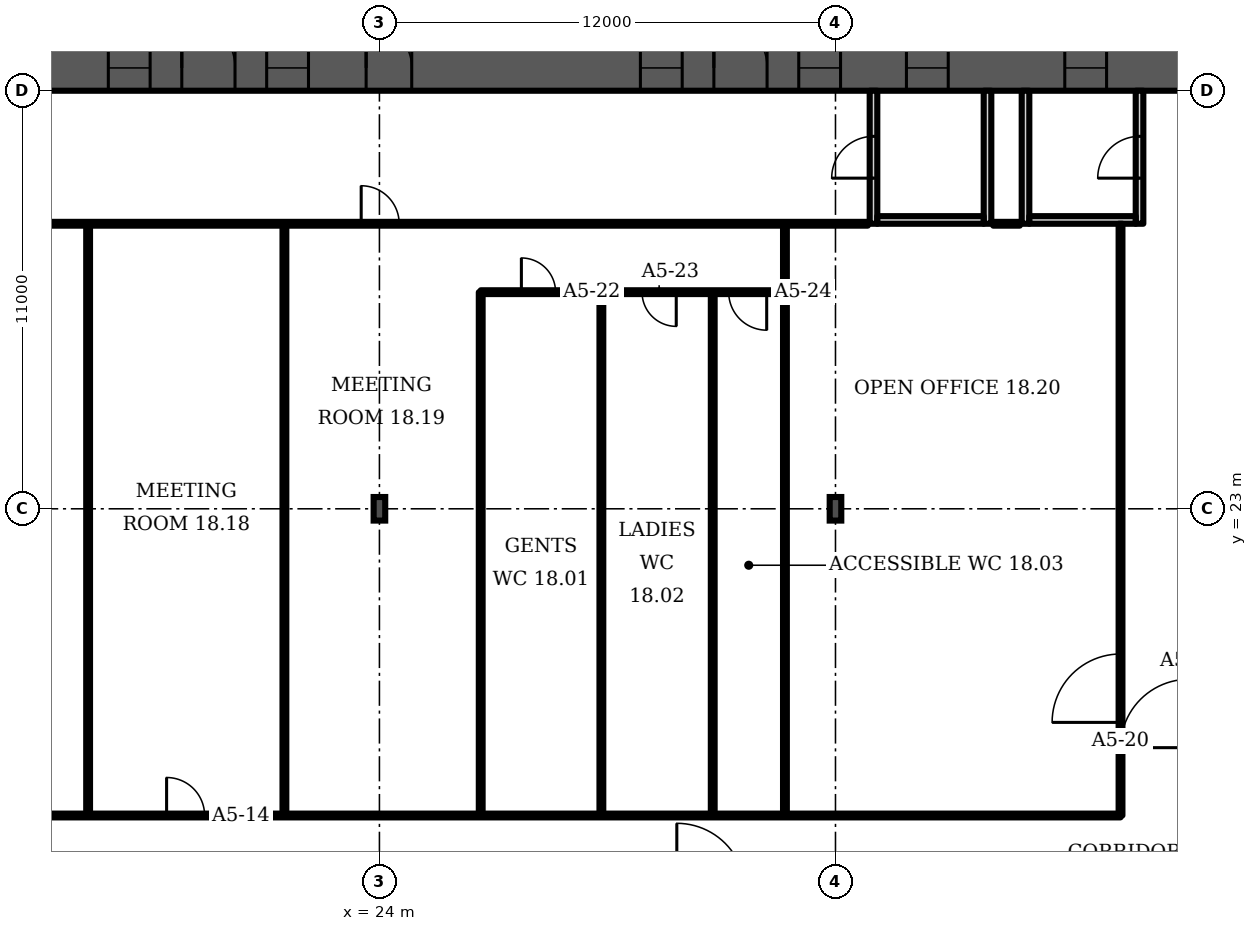
"""IFC4 building model, lengths in metres.
Left out: names, types, materials, properties, quantities, classifications, styles, units other than length and angle.
Written with IfcOpenShell. Run it as: python <this file> out.ifc"""

import sys

from ifc_helpers import new_model, si_unit, direction, frame, frame_2d, origin, origin_2d, place, context, subcontext, project, spatial, rectangle, i_section, extrude, element, fill, save


model = new_model("IFC4")
c1 = context("Model", 3, precision=1e-05, world=origin(), true_north=direction((0.0, 1.0)))
c2 = subcontext(c1, "Body", "Model", "MODEL_VIEW")
j1 = project(units=[si_unit("LENGTHUNIT", "METRE"), si_unit("PLANEANGLEUNIT", "RADIAN")], contexts=[c1])
p1 = place(None, origin())
s1 = spatial("IfcSite", under=j1, at=p1, CompositionType="ELEMENT")
p2 = place(p1, origin())
s2 = spatial("IfcBuilding", under=s1, at=p2, CompositionType="ELEMENT")
p3 = place(p2, frame((0.0, 0.0, 84.7)))
s3 = spatial("IfcBuildingStorey", under=s2, at=p3, CompositionType="ELEMENT", Elevation=84.7)
p4 = place(p3, frame((9.0, 34.6, 0.0), z_axis=(0.0, 0.0, 1.0), x_axis=(1.0, 0.0, 0.0)))
e1 = element("IfcWall", 1, at=p4, inside=s3, PredefinedType="SHEAR", context=c2, shape_type="SweptSolid", body=[
    extrude(rectangle(XDim=56.0, YDim=1.2, at=frame_2d((28.0, 0.0))), origin(), (0.0, 0.0, 1.0), 3.6),
])
p5 = place(p4, frame((3.3, 0.0, 0.0)))
e2 = element("IfcOpeningElement", 2, at=p5, cuts=e1, PredefinedType="OPENING", context=c2, shape_type="SweptSolid", body=[
    extrude(rectangle(XDim=1.0, YDim=2.1, at=frame_2d((0.5, 1.05))), frame((0.0, 0.61, 0.0), z_axis=(0.0, -1.0, 0.0), x_axis=(1.0, 0.0, 0.0)), (0.0, 0.0, 1.0), 1.22),
])
p6 = place(p4, frame((7.867, 0.0, 0.0)))
e3 = element("IfcOpeningElement", 3, at=p6, cuts=e1, PredefinedType="OPENING", context=c2, shape_type="SweptSolid", body=[
    extrude(rectangle(XDim=1.1, YDim=2.1, at=frame_2d((0.55, 1.05))), frame((0.0, 0.61, 0.0), z_axis=(0.0, -1.0, 0.0), x_axis=(1.0, 0.0, 0.0)), (0.0, 0.0, 1.0), 1.22),
])
p7 = place(p4, frame((12.033, 0.0, 0.0)))
e4 = element("IfcOpeningElement", 4, at=p7, cuts=e1, PredefinedType="OPENING", context=c2, shape_type="SweptSolid", body=[
    extrude(rectangle(XDim=1.1, YDim=2.1, at=frame_2d((0.55, 1.05))), frame((0.0, 0.61, 0.0), z_axis=(0.0, -1.0, 0.0), x_axis=(1.0, 0.0, 0.0)), (0.0, 0.0, 1.0), 1.22),
])
p8 = place(p4, frame((9.8, 0.0, 0.0)))
e5 = element("IfcOpeningElement", 5, at=p8, cuts=e1, PredefinedType="OPENING", context=c2, shape_type="SweptSolid", body=[
    extrude(rectangle(XDim=1.4, YDim=2.1, at=frame_2d((0.7, 1.05))), frame((0.0, 0.61, 0.0), z_axis=(0.0, -1.0, 0.0), x_axis=(1.0, 0.0, 0.0)), (0.0, 0.0, 1.0), 1.22),
])
p9 = place(p4, frame((14.65, 0.0, 0.0)))
e6 = element("IfcOpeningElement", 6, at=p9, cuts=e1, PredefinedType="OPENING", context=c2, shape_type="SweptSolid", body=[
    extrude(rectangle(XDim=1.2, YDim=2.1, at=frame_2d((0.6, 1.05))), frame((0.0, 0.61, 0.0), z_axis=(0.0, -1.0, 0.0), x_axis=(1.0, 0.0, 0.0)), (0.0, 0.0, 1.0), 1.22),
])
p10 = place(p4, frame((21.867, 0.0, 0.0)))
e7 = element("IfcOpeningElement", 7, at=p10, cuts=e1, PredefinedType="OPENING", context=c2, shape_type="SweptSolid", body=[
    extrude(rectangle(XDim=1.1, YDim=2.1, at=frame_2d((0.55, 1.05))), frame((0.0, 0.61, 0.0), z_axis=(0.0, -1.0, 0.0), x_axis=(1.0, 0.0, 0.0)), (0.0, 0.0, 1.0), 1.22),
])
p11 = place(p4, frame((26.033, 0.0, 0.0)))
e8 = element("IfcOpeningElement", 8, at=p11, cuts=e1, PredefinedType="OPENING", context=c2, shape_type="SweptSolid", body=[
    extrude(rectangle(XDim=1.1, YDim=2.1, at=frame_2d((0.55, 1.05))), frame((0.0, 0.61, 0.0), z_axis=(0.0, -1.0, 0.0), x_axis=(1.0, 0.0, 0.0)), (0.0, 0.0, 1.0), 1.22),
])
p12 = place(p4, frame((23.8, 0.0, 0.0)))
e9 = element("IfcOpeningElement", 9, at=p12, cuts=e1, PredefinedType="OPENING", context=c2, shape_type="SweptSolid", body=[
    extrude(rectangle(XDim=1.4, YDim=2.1, at=frame_2d((0.7, 1.05))), frame((0.0, 0.61, 0.0), z_axis=(0.0, -1.0, 0.0), x_axis=(1.0, 0.0, 0.0)), (0.0, 0.0, 1.0), 1.22),
])
p13 = place(p4, frame((28.867, 0.0, 0.0)))
e10 = element("IfcOpeningElement", 10, at=p13, cuts=e1, PredefinedType="OPENING", context=c2, shape_type="SweptSolid", body=[
    extrude(rectangle(XDim=1.1, YDim=2.1, at=frame_2d((0.55, 1.05))), frame((0.0, 0.61, 0.0), z_axis=(0.0, -1.0, 0.0), x_axis=(1.0, 0.0, 0.0)), (0.0, 0.0, 1.0), 1.22),
])
p14 = place(p4, frame((33.033, 0.0, 0.0)))
e11 = element("IfcOpeningElement", 11, at=p14, cuts=e1, PredefinedType="OPENING", context=c2, shape_type="SweptSolid", body=[
    extrude(rectangle(XDim=1.1, YDim=2.1, at=frame_2d((0.55, 1.05))), frame((0.0, 0.61, 0.0), z_axis=(0.0, -1.0, 0.0), x_axis=(1.0, 0.0, 0.0)), (0.0, 0.0, 1.0), 1.22),
])
p15 = place(p4, frame((40.15, 0.0, 0.0)))
e12 = element("IfcOpeningElement", 12, at=p15, cuts=e1, PredefinedType="OPENING", context=c2, shape_type="SweptSolid", body=[
    extrude(rectangle(XDim=1.2, YDim=2.1, at=frame_2d((0.6, 1.05))), frame((0.0, 0.61, 0.0), z_axis=(0.0, -1.0, 0.0), x_axis=(1.0, 0.0, 0.0)), (0.0, 0.0, 1.0), 1.22),
])
p16 = place(p4, frame((44.8, 0.0, 0.0)))
e13 = element("IfcOpeningElement", 13, at=p16, cuts=e1, PredefinedType="OPENING", context=c2, shape_type="SweptSolid", body=[
    extrude(rectangle(XDim=1.4, YDim=2.1, at=frame_2d((0.7, 1.05))), frame((0.0, 0.61, 0.0), z_axis=(0.0, -1.0, 0.0), x_axis=(1.0, 0.0, 0.0)), (0.0, 0.0, 1.0), 1.22),
])
p17 = place(p4, frame((49.867, 0.0, 0.0)))
e14 = element("IfcOpeningElement", 14, at=p17, cuts=e1, PredefinedType="OPENING", context=c2, shape_type="SweptSolid", body=[
    extrude(rectangle(XDim=1.1, YDim=2.1, at=frame_2d((0.55, 1.05))), frame((0.0, 0.61, 0.0), z_axis=(0.0, -1.0, 0.0), x_axis=(1.0, 0.0, 0.0)), (0.0, 0.0, 1.0), 1.22),
])
p18 = place(p4, frame((53.5, 0.0, 0.0)))
e15 = element("IfcOpeningElement", 15, at=p18, cuts=e1, PredefinedType="OPENING", context=c2, shape_type="SweptSolid", body=[
    extrude(rectangle(XDim=1.1, YDim=2.1, at=frame_2d((0.55, 1.05))), frame((0.0, 0.61, 0.0), z_axis=(0.0, -1.0, 0.0), x_axis=(1.0, 0.0, 0.0)), (0.0, 0.0, 1.0), 1.22),
])
p19 = place(p4, frame((51.567, 0.0, 0.0)))
e16 = element("IfcOpeningElement", 16, at=p19, cuts=e1, PredefinedType="OPENING", context=c2, shape_type="SweptSolid", body=[
    extrude(rectangle(XDim=1.4, YDim=2.1, at=frame_2d((0.7, 1.05))), frame((0.0, 0.61, 0.0), z_axis=(0.0, -1.0, 0.0), x_axis=(1.0, 0.0, 0.0)), (0.0, 0.0, 1.0), 1.22),
])
for number, where, z_axis, x_axis in (
    (17, (24.0, 23.0, 0.0), (0.0, 0.0, 1.0), (1.0, 0.0, 0.0)),
    (18, (36.0, 23.0, 0.0), (0.0, 0.0, 1.0), (1.0, 0.0, 0.0)),
):
    element("IfcColumn", number, at=place(p3, frame(where, z_axis=z_axis, x_axis=x_axis)), inside=s3, PredefinedType="COLUMN", context=c2, shape_type="SweptSolid", body=[
        extrude(i_section(OverallWidth=0.305, OverallDepth=0.62, WebThickness=0.021, FlangeThickness=0.04, FilletRadius=0.027, at=origin_2d()), origin(), (0.0, 0.0, 1.0), 3.6),
    ])
p20 = place(p3, frame((37.0, 30.5, 0.0), z_axis=(0.0, 0.0, 1.0), x_axis=(0.0, 1.0, 0.0)))
e19 = element("IfcWall", 19, at=p20, inside=s3, PredefinedType="PARTITIONING", context=c2, shape_type="SweptSolid", body=[
    extrude(rectangle(XDim=3.5, YDim=0.2, at=frame_2d((1.75, 0.0))), origin(), (0.0, 0.0, 1.0), 3.2),
])
p21 = place(p20, frame((1.2, 0.0, 0.0)))
e20 = element("IfcOpeningElement", 20, at=p21, cuts=e19, PredefinedType="OPENING", context=c2, shape_type="SweptSolid", body=[
    extrude(rectangle(XDim=1.1, YDim=2.1, at=frame_2d((0.55, 1.05))), frame((0.0, 0.11, 0.0), z_axis=(0.0, -1.0, 0.0), x_axis=(1.0, 0.0, 0.0)), (0.0, 0.0, 1.0), 0.22),
])
p22 = place(p3, frame((40.0, 30.5, 0.0), z_axis=(0.0, 0.0, 1.0), x_axis=(0.0, 1.0, 0.0)))
e21 = element("IfcWall", 21, at=p22, inside=s3, PredefinedType="PARTITIONING", context=c2, shape_type="SweptSolid", body=[
    extrude(rectangle(XDim=3.5, YDim=0.2, at=frame_2d((1.75, 0.0))), origin(), (0.0, 0.0, 1.0), 3.2),
])
p23 = place(p3, frame((37.1, 30.6, 0.0), z_axis=(0.0, 0.0, 1.0), x_axis=(1.0, 0.0, 0.0)))
e22 = element("IfcWall", 22, at=p23, inside=s3, PredefinedType="PARTITIONING", context=c2, shape_type="SweptSolid", body=[
    extrude(rectangle(XDim=2.8, YDim=0.2, at=frame_2d((1.4, 0.0))), origin(), (0.0, 0.0, 1.0), 3.2),
])
p24 = place(p3, frame((41.0, 30.5, 0.0), z_axis=(0.0, 0.0, 1.0), x_axis=(0.0, 1.0, 0.0)))
e23 = element("IfcWall", 23, at=p24, inside=s3, PredefinedType="PARTITIONING", context=c2, shape_type="SweptSolid", body=[
    extrude(rectangle(XDim=3.5, YDim=0.2, at=frame_2d((1.75, 0.0))), origin(), (0.0, 0.0, 1.0), 3.2),
])
p25 = place(p3, frame((44.0, 30.5, 0.0), z_axis=(0.0, 0.0, 1.0), x_axis=(0.0, 1.0, 0.0)))
e24 = element("IfcWall", 24, at=p25, inside=s3, PredefinedType="PARTITIONING", context=c2, shape_type="SweptSolid", body=[
    extrude(rectangle(XDim=3.5, YDim=0.2, at=frame_2d((1.75, 0.0))), origin(), (0.0, 0.0, 1.0), 3.2),
])
p26 = place(p25, frame((1.2, 0.0, 0.0)))
e25 = element("IfcOpeningElement", 25, at=p26, cuts=e24, PredefinedType="OPENING", context=c2, shape_type="SweptSolid", body=[
    extrude(rectangle(XDim=1.1, YDim=2.1, at=frame_2d((0.55, 1.05))), frame((0.0, 0.11, 0.0), z_axis=(0.0, -1.0, 0.0), x_axis=(1.0, 0.0, 0.0)), (0.0, 0.0, 1.0), 0.22),
])
p27 = place(p3, frame((41.1, 30.6, 0.0), z_axis=(0.0, 0.0, 1.0), x_axis=(1.0, 0.0, 0.0)))
e26 = element("IfcWall", 26, at=p27, inside=s3, PredefinedType="PARTITIONING", context=c2, shape_type="SweptSolid", body=[
    extrude(rectangle(XDim=2.8, YDim=0.2, at=frame_2d((1.4, 0.0))), origin(), (0.0, 0.0, 1.0), 3.2),
])
p28 = place(p3, frame((9.0, 30.5, 0.0), z_axis=(0.0, 0.0, 1.0), x_axis=(1.0, 0.0, 0.0)))
e27 = element("IfcWall", 27, at=p28, inside=s3, PredefinedType="PARTITIONING", context=c2, shape_type="SweptSolid", body=[
    extrude(rectangle(XDim=27.85, YDim=0.1, at=frame_2d((13.925, 0.0))), origin(), (0.0, 0.0, 1.0), 3.2),
])
p29 = place(p28, frame((14.52, 0.0, 0.0)))
e28 = element("IfcOpeningElement", 28, at=p29, cuts=e27, PredefinedType="OPENING", context=c2, shape_type="SweptSolid", body=[
    extrude(rectangle(XDim=1.0, YDim=2.1, at=frame_2d((0.5, 1.05))), frame((0.0, 0.06, 0.0), z_axis=(0.0, -1.0, 0.0), x_axis=(1.0, 0.0, 0.0)), (0.0, 0.0, 1.0), 0.12),
])
p30 = place(p3, frame((10.8, 14.93, 0.0), z_axis=(0.0, 0.0, 1.0), x_axis=(1.0, 0.0, 0.0)))
e29 = element("IfcWall", 29, at=p30, inside=s3, PredefinedType="PARTITIONING", context=c2, shape_type="SweptSolid", body=[
    extrude(rectangle(XDim=32.7, YDim=0.1, at=frame_2d((16.35, 0.0))), origin(), (0.0, 0.0, 1.0), 3.2),
])
p31 = place(p30, frame((7.6, 0.0, 0.0)))
e30 = element("IfcOpeningElement", 30, at=p31, cuts=e29, PredefinedType="OPENING", context=c2, shape_type="SweptSolid", body=[
    extrude(rectangle(XDim=1.0, YDim=2.1, at=frame_2d((0.5, 1.05))), frame((0.0, 0.06, 0.0), z_axis=(0.0, -1.0, 0.0), x_axis=(1.0, 0.0, 0.0)), (0.0, 0.0, 1.0), 0.12),
])
for number, where, z_axis, x_axis in (
    (31, (16.335, 14.93, 0.0), (0.0, 0.0, 1.0), (0.0, 1.0, 0.0)),
    (32, (21.5, 14.93, 0.0), (0.0, 0.0, 1.0), (0.0, 1.0, 0.0)),
):
    element("IfcWall", number, at=place(p3, frame(where, z_axis=z_axis, x_axis=x_axis)), inside=s3, PredefinedType="PARTITIONING", context=c2, shape_type="SweptSolid", body=[
        extrude(rectangle(XDim=15.57, YDim=0.1, at=frame_2d((7.785, 0.0))), origin(), (0.0, 0.0, 1.0), 3.2),
    ])
p32 = place(p3, frame((26.665, 14.93, 0.0), z_axis=(0.0, 0.0, 1.0), x_axis=(0.0, 1.0, 0.0)))
e33 = element("IfcWall", 33, at=p32, inside=s3, PredefinedType="PARTITIONING", context=c2, shape_type="SweptSolid", body=[
    extrude(rectangle(XDim=13.77, YDim=0.1, at=frame_2d((6.885, 0.0))), origin(), (0.0, 0.0, 1.0), 3.2),
])
p33 = place(p3, frame((26.665, 28.7, 0.0), z_axis=(0.0, 0.0, 1.0), x_axis=(1.0, 0.0, 0.0)))
e34 = element("IfcWall", 34, at=p33, inside=s3, PredefinedType="PARTITIONING", context=c2, shape_type="SweptSolid", body=[
    extrude(rectangle(XDim=8.0, YDim=0.1, at=frame_2d((4.0, 0.0))), origin(), (0.0, 0.0, 1.0), 3.2),
])
p34 = place(p33, frame((1.07, 0.0, 0.0)))
e35 = element("IfcOpeningElement", 35, at=p34, cuts=e34, PredefinedType="OPENING", context=c2, shape_type="SweptSolid", body=[
    extrude(rectangle(XDim=0.9, YDim=2.1, at=frame_2d((0.45, 1.05))), frame((0.0, 0.06, 0.0), z_axis=(0.0, -1.0, 0.0), x_axis=(1.0, 0.0, 0.0)), (0.0, 0.0, 1.0), 0.12),
])
p35 = place(p33, frame((4.245, 0.0, 0.0)))
e36 = element("IfcOpeningElement", 36, at=p35, cuts=e34, PredefinedType="OPENING", context=c2, shape_type="SweptSolid", body=[
    extrude(rectangle(XDim=0.9, YDim=2.1, at=frame_2d((0.45, 1.05))), frame((0.0, 0.06, 0.0), z_axis=(0.0, -1.0, 0.0), x_axis=(1.0, 0.0, 0.0)), (0.0, 0.0, 1.0), 0.12),
])
p36 = place(p33, frame((6.525, 0.0, 0.0)))
e37 = element("IfcOpeningElement", 37, at=p36, cuts=e34, PredefinedType="OPENING", context=c2, shape_type="SweptSolid", body=[
    extrude(rectangle(XDim=1.0, YDim=2.1, at=frame_2d((0.5, 1.05))), frame((0.0, 0.06, 0.0), z_axis=(0.0, -1.0, 0.0), x_axis=(1.0, 0.0, 0.0)), (0.0, 0.0, 1.0), 0.12),
])
for number, where, z_axis, x_axis in (
    (38, (29.84, 14.93, 0.0), (0.0, 0.0, 1.0), (0.0, 1.0, 0.0)),
    (39, (32.77, 14.93, 0.0), (0.0, 0.0, 1.0), (0.0, 1.0, 0.0)),
):
    element("IfcWall", number, at=place(p3, frame(where, z_axis=z_axis, x_axis=x_axis)), inside=s3, PredefinedType="PARTITIONING", context=c2, shape_type="SweptSolid", body=[
        extrude(rectangle(XDim=13.77, YDim=0.1, at=frame_2d((6.885, 0.0))), origin(), (0.0, 0.0, 1.0), 3.2),
    ])
p37 = place(p3, frame((34.67, 14.93, 0.0), z_axis=(0.0, 0.0, 1.0), x_axis=(0.0, 1.0, 0.0)))
e40 = element("IfcWall", 40, at=p37, inside=s3, PredefinedType="PARTITIONING", context=c2, shape_type="SweptSolid", body=[
    extrude(rectangle(XDim=15.56, YDim=0.1, at=frame_2d((7.78, 0.0))), origin(), (0.0, 0.0, 1.0), 3.2),
])
p38 = place(p3, frame((43.5, 14.93, 0.0), z_axis=(0.0, 0.0, 1.0), x_axis=(0.0, 1.0, 0.0)))
e41 = element("IfcWall", 41, at=p38, inside=s3, PredefinedType="PARTITIONING", context=c2, shape_type="SweptSolid", body=[
    extrude(rectangle(XDim=15.57, YDim=0.1, at=frame_2d((7.785, 0.0))), origin(), (0.0, 0.0, 1.0), 3.2),
])
p39 = place(p38, frame((2.45, 0.0, 0.0)))
e42 = element("IfcOpeningElement", 42, at=p39, cuts=e41, PredefinedType="OPENING", context=c2, shape_type="SweptSolid", body=[
    extrude(rectangle(XDim=1.8, YDim=2.1, at=frame_2d((0.9, 1.05))), frame((0.0, 0.06, 0.0), z_axis=(0.0, -1.0, 0.0), x_axis=(1.0, 0.0, 0.0)), (0.0, 0.0, 1.0), 0.12),
])
p40 = place(p3, frame((40.15, 30.5, 0.0), z_axis=(0.0, 0.0, 1.0), x_axis=(1.0, 0.0, 0.0)))
e43 = element("IfcWall", 43, at=p40, inside=s3, PredefinedType="PARTITIONING", context=c2, shape_type="SweptSolid", body=[
    extrude(rectangle(XDim=0.7, YDim=0.1, at=frame_2d((0.35, 0.0))), origin(), (0.0, 0.0, 1.0), 3.2),
])
p41 = place(p6, origin())
e44 = element("IfcDoor", 44, at=p41, inside=s3, OperationType="DOUBLE_DOOR_SLIDING", PredefinedType="DOOR", context=c2, shape_type="SweptSolid", body=[
    extrude(rectangle(XDim=1.1, YDim=2.1, at=frame_2d((0.55, 1.05))), frame((0.0, 0.025, 0.0), z_axis=(0.0, -1.0, 0.0), x_axis=(1.0, 0.0, 0.0)), (0.0, 0.0, 1.0), 0.05),
])
fill(e3, e44)
p42 = place(p7, origin())
e45 = element("IfcDoor", 45, at=p42, inside=s3, OperationType="DOUBLE_DOOR_SLIDING", PredefinedType="DOOR", context=c2, shape_type="SweptSolid", body=[
    extrude(rectangle(XDim=1.1, YDim=2.1, at=frame_2d((0.55, 1.05))), frame((0.0, 0.025, 0.0), z_axis=(0.0, -1.0, 0.0), x_axis=(1.0, 0.0, 0.0)), (0.0, 0.0, 1.0), 0.05),
])
fill(e4, e45)
p43 = place(p8, origin())
e46 = element("IfcDoor", 46, at=p43, inside=s3, OperationType="DOUBLE_DOOR_SINGLE_SWING", PredefinedType="DOOR", context=c2, shape_type="SweptSolid", body=[
    extrude(rectangle(XDim=1.4, YDim=2.1, at=frame_2d((0.7, 1.05))), frame((0.0, 0.025, 0.0), z_axis=(0.0, -1.0, 0.0), x_axis=(1.0, 0.0, 0.0)), (0.0, 0.0, 1.0), 0.05),
])
fill(e5, e46)
p44 = place(p9, origin())
e47 = element("IfcDoor", 47, at=p44, inside=s3, OperationType="SINGLE_SWING_LEFT", PredefinedType="DOOR", context=c2, shape_type="SweptSolid", body=[
    extrude(rectangle(XDim=1.2, YDim=2.1, at=frame_2d((0.6, 1.05))), frame((0.0, 0.025, 0.0), z_axis=(0.0, -1.0, 0.0), x_axis=(1.0, 0.0, 0.0)), (0.0, 0.0, 1.0), 0.05),
])
fill(e6, e47)
p45 = place(p10, origin())
e48 = element("IfcDoor", 48, at=p45, inside=s3, OperationType="DOUBLE_DOOR_SLIDING", PredefinedType="DOOR", context=c2, shape_type="SweptSolid", body=[
    extrude(rectangle(XDim=1.1, YDim=2.1, at=frame_2d((0.55, 1.05))), frame((0.0, 0.025, 0.0), z_axis=(0.0, -1.0, 0.0), x_axis=(1.0, 0.0, 0.0)), (0.0, 0.0, 1.0), 0.05),
])
fill(e7, e48)
p46 = place(p11, origin())
e49 = element("IfcDoor", 49, at=p46, inside=s3, OperationType="DOUBLE_DOOR_SLIDING", PredefinedType="DOOR", context=c2, shape_type="SweptSolid", body=[
    extrude(rectangle(XDim=1.1, YDim=2.1, at=frame_2d((0.55, 1.05))), frame((0.0, 0.025, 0.0), z_axis=(0.0, -1.0, 0.0), x_axis=(1.0, 0.0, 0.0)), (0.0, 0.0, 1.0), 0.05),
])
fill(e8, e49)
p47 = place(p12, origin())
e50 = element("IfcDoor", 50, at=p47, inside=s3, OperationType="DOUBLE_DOOR_SINGLE_SWING", PredefinedType="DOOR", context=c2, shape_type="SweptSolid", body=[
    extrude(rectangle(XDim=1.4, YDim=2.1, at=frame_2d((0.7, 1.05))), frame((0.0, 0.025, 0.0), z_axis=(0.0, -1.0, 0.0), x_axis=(1.0, 0.0, 0.0)), (0.0, 0.0, 1.0), 0.05),
])
fill(e9, e50)
p48 = place(p13, origin())
e51 = element("IfcDoor", 51, at=p48, inside=s3, OperationType="DOUBLE_DOOR_SLIDING", PredefinedType="DOOR", context=c2, shape_type="SweptSolid", body=[
    extrude(rectangle(XDim=1.1, YDim=2.1, at=frame_2d((0.55, 1.05))), frame((0.0, 0.025, 0.0), z_axis=(0.0, -1.0, 0.0), x_axis=(1.0, 0.0, 0.0)), (0.0, 0.0, 1.0), 0.05),
])
fill(e10, e51)
p49 = place(p14, origin())
e52 = element("IfcDoor", 52, at=p49, inside=s3, OperationType="DOUBLE_DOOR_SLIDING", PredefinedType="DOOR", context=c2, shape_type="SweptSolid", body=[
    extrude(rectangle(XDim=1.1, YDim=2.1, at=frame_2d((0.55, 1.05))), frame((0.0, 0.025, 0.0), z_axis=(0.0, -1.0, 0.0), x_axis=(1.0, 0.0, 0.0)), (0.0, 0.0, 1.0), 0.05),
])
fill(e11, e52)
p50 = place(p21, origin())
e53 = element("IfcDoor", 53, at=p50, inside=s3, OperationType="SINGLE_SWING_LEFT", PredefinedType="DOOR", context=c2, shape_type="SweptSolid", body=[
    extrude(rectangle(XDim=1.1, YDim=2.1, at=frame_2d((0.55, 1.05))), frame((0.0, 0.025, 0.0), z_axis=(0.0, -1.0, 0.0), x_axis=(1.0, 0.0, 0.0)), (0.0, 0.0, 1.0), 0.05),
])
fill(e20, e53)
p51 = place(p26, origin())
e54 = element("IfcDoor", 54, at=p51, inside=s3, OperationType="SINGLE_SWING_LEFT", PredefinedType="DOOR", context=c2, shape_type="SweptSolid", body=[
    extrude(rectangle(XDim=1.1, YDim=2.1, at=frame_2d((0.55, 1.05))), frame((0.0, 0.025, 0.0), z_axis=(0.0, -1.0, 0.0), x_axis=(1.0, 0.0, 0.0)), (0.0, 0.0, 1.0), 0.05),
])
fill(e25, e54)
p52 = place(p31, origin())
e55 = element("IfcDoor", 55, at=p52, inside=s3, OperationType="SINGLE_SWING_LEFT", PredefinedType="DOOR", context=c2, shape_type="SweptSolid", body=[
    extrude(rectangle(XDim=1.0, YDim=2.1, at=frame_2d((0.5, 1.05))), frame((0.0, 0.025, 0.0), z_axis=(0.0, -1.0, 0.0), x_axis=(1.0, 0.0, 0.0)), (0.0, 0.0, 1.0), 0.05),
])
fill(e30, e55)
p53 = place(p39, origin())
e56 = element("IfcDoor", 56, at=p53, inside=s3, OperationType="DOUBLE_DOOR_SINGLE_SWING", PredefinedType="DOOR", context=c2, shape_type="SweptSolid", body=[
    extrude(rectangle(XDim=1.8, YDim=2.1, at=frame_2d((0.9, 1.05))), frame((0.0, 0.025, 0.0), z_axis=(0.0, -1.0, 0.0), x_axis=(1.0, 0.0, 0.0)), (0.0, 0.0, 1.0), 0.05),
])
fill(e42, e56)
p54 = place(p34, origin())
e57 = element("IfcDoor", 57, at=p54, inside=s3, OperationType="SINGLE_SWING_LEFT", PredefinedType="DOOR", context=c2, shape_type="SweptSolid", body=[
    extrude(rectangle(XDim=0.9, YDim=2.1, at=frame_2d((0.45, 1.05))), frame((0.0, 0.025, 0.0), z_axis=(0.0, -1.0, 0.0), x_axis=(1.0, 0.0, 0.0)), (0.0, 0.0, 1.0), 0.05),
])
fill(e35, e57)
p55 = place(p35, origin())
e58 = element("IfcDoor", 58, at=p55, inside=s3, OperationType="SINGLE_SWING_RIGHT", PredefinedType="DOOR", context=c2, shape_type="SweptSolid", body=[
    extrude(rectangle(XDim=0.9, YDim=2.1, at=frame_2d((0.45, 1.05))), frame((0.0, 0.025, 0.0), z_axis=(0.0, -1.0, 0.0), x_axis=(1.0, 0.0, 0.0)), (0.0, 0.0, 1.0), 0.05),
])
fill(e36, e58)
p56 = place(p36, origin())
e59 = element("IfcDoor", 59, at=p56, inside=s3, OperationType="SINGLE_SWING_RIGHT", PredefinedType="DOOR", context=c2, shape_type="SweptSolid", body=[
    extrude(rectangle(XDim=1.0, YDim=2.1, at=frame_2d((0.5, 1.05))), frame((0.0, 0.025, 0.0), z_axis=(0.0, -1.0, 0.0), x_axis=(1.0, 0.0, 0.0)), (0.0, 0.0, 1.0), 0.05),
])
fill(e37, e59)
p57 = place(p29, origin())
e60 = element("IfcDoor", 60, at=p57, inside=s3, OperationType="SINGLE_SWING_LEFT", PredefinedType="DOOR", context=c2, shape_type="SweptSolid", body=[
    extrude(rectangle(XDim=1.0, YDim=2.1, at=frame_2d((0.5, 1.05))), frame((0.0, 0.025, 0.0), z_axis=(0.0, -1.0, 0.0), x_axis=(1.0, 0.0, 0.0)), (0.0, 0.0, 1.0), 0.05),
])
fill(e28, e60)
save(model, sys.argv[1])
